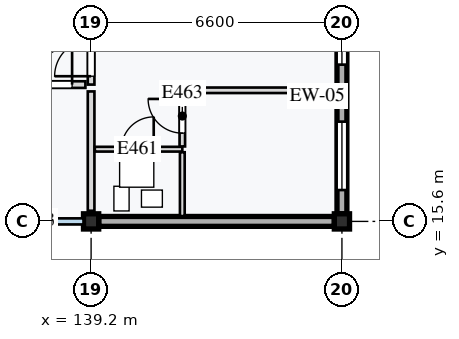
"""IFC4 building model, lengths in metres.
Left out: names, types, materials, properties, quantities, classifications, styles, units other than length and angle.
Written with IfcOpenShell. Run it as: python <this file> out.ifc"""

import sys

from ifc_helpers import new_model, si_unit, direction, frame, frame_2d, origin, origin_2d, place, context, subcontext, project, spatial, rectangle, extrude, element, fill, save


model = new_model("IFC4")
c1 = context("Model", 3, precision=1e-05, world=origin(), true_north=direction((0.0, 1.0)))
c2 = subcontext(c1, "Body", "Model", "MODEL_VIEW")
j1 = project(units=[si_unit("LENGTHUNIT", "METRE"), si_unit("PLANEANGLEUNIT", "RADIAN")], contexts=[c1])
p1 = place(None, origin())
s1 = spatial("IfcSite", under=j1, at=p1, CompositionType="ELEMENT")
p2 = place(p1, origin())
s2 = spatial("IfcBuilding", under=s1, at=p2, CompositionType="ELEMENT")
p3 = place(p2, frame((0.0, 0.0, 40.4)))
s3 = spatial("IfcBuildingStorey", under=s2, at=p3, CompositionType="ELEMENT", Elevation=40.4)
for number, where, z_axis, x_axis in (
    (1, (139.2, 15.6, 0.0), (0.0, 0.0, 1.0), (1.0, 0.0, 0.0)),
    (2, (145.8, 15.6, 0.0), (0.0, 0.0, 1.0), (1.0, 0.0, 0.0)),
):
    element("IfcColumn", number, at=place(p3, frame(where, z_axis=z_axis, x_axis=x_axis)), inside=s3, PredefinedType="COLUMN", context=c2, shape_type="SweptSolid", body=[
        extrude(rectangle(XDim=0.4, YDim=0.4, at=origin_2d()), origin(), (0.0, 0.0, 1.0), 3.2),
    ])
p4 = place(p3, frame((145.8, 15.8, 0.0), z_axis=(0.0, 0.0, 1.0), x_axis=(0.0, 1.0, 0.0)))
e3 = element("IfcWall", 3, at=p4, inside=s3, PredefinedType="STANDARD", context=c2, shape_type="SweptSolid", body=[
    extrude(rectangle(XDim=6.2, YDim=0.26, at=frame_2d((3.1, 0.0))), origin(), (0.0, 0.0, 1.0), 2.6),
])
p5 = place(p4, frame((0.625, 0.0, 0.85)))
e4 = element("IfcOpeningElement", 4, at=p5, cuts=e3, PredefinedType="OPENING", context=c2, shape_type="SweptSolid", body=[
    extrude(rectangle(XDim=1.8, YDim=1.35, at=frame_2d((0.9, 0.675))), frame((0.0, 0.14, 0.0), z_axis=(0.0, -1.0, 0.0), x_axis=(1.0, 0.0, 0.0)), (0.0, 0.0, 1.0), 0.28),
])
p6 = place(p4, frame((3.925, 0.0, 0.85)))
e5 = element("IfcOpeningElement", 5, at=p6, cuts=e3, PredefinedType="OPENING", context=c2, shape_type="SweptSolid", body=[
    extrude(rectangle(XDim=1.8, YDim=1.55, at=frame_2d((0.9, 0.775))), frame((0.0, 0.14, 0.0), z_axis=(0.0, -1.0, 0.0), x_axis=(1.0, 0.0, 0.0)), (0.0, 0.0, 1.0), 0.28),
])
p7 = place(p3, frame((139.4, 15.6, 0.0), z_axis=(0.0, 0.0, 1.0), x_axis=(1.0, 0.0, 0.0)))
e6 = element("IfcWall", 6, at=p7, inside=s3, PredefinedType="STANDARD", context=c2, shape_type="SweptSolid", body=[
    extrude(rectangle(XDim=6.2, YDim=0.26, at=frame_2d((3.1, 0.0))), origin(), (0.0, 0.0, 1.0), 2.65),
])
p8 = place(p3, frame((136.05, 19.2, 0.0), z_axis=(0.0, 0.0, 1.0), x_axis=(1.0, 0.0, 0.0)))
e7 = element("IfcWall", 7, at=p8, inside=s3, PredefinedType="PARTITIONING", context=c2, shape_type="SweptSolid", body=[
    extrude(rectangle(XDim=3.0, YDim=0.175, at=frame_2d((1.5, 0.0))), origin(), (0.0, 0.0, 1.0), 2.94),
])
p9 = place(p8, frame((1.65, 0.0, 0.0)))
e8 = element("IfcOpeningElement", 8, at=p9, cuts=e7, PredefinedType="OPENING", context=c2, shape_type="SweptSolid", body=[
    extrude(rectangle(XDim=1.0, YDim=2.1, at=frame_2d((0.5, 1.05))), frame((0.0, 0.097, 0.0), z_axis=(0.0, -1.0, 0.0), x_axis=(1.0, 0.0, 0.0)), (0.0, 0.0, 1.0), 0.195),
])
p10 = place(p3, frame((139.2, 15.88, 0.0), z_axis=(0.0, 0.0, 1.0), x_axis=(0.0, 1.0, 0.0)))
e9 = element("IfcWall", 9, at=p10, inside=s3, PredefinedType="PARTITIONING", context=c2, shape_type="SweptSolid", body=[
    extrude(rectangle(XDim=3.14, YDim=0.175, at=frame_2d((1.57, 0.0))), origin(), (0.0, 0.0, 1.0), 2.55),
])
p11 = place(p3, frame((139.2, 19.2, 0.0), z_axis=(0.0, 0.0, 1.0), x_axis=(0.0, 1.0, 0.0)))
e10 = element("IfcWall", 10, at=p11, inside=s3, PredefinedType="PARTITIONING", context=c2, shape_type="SweptSolid", body=[
    extrude(rectangle(XDim=3.0, YDim=0.175, at=frame_2d((1.5, 0.0))), origin(), (0.0, 0.0, 1.0), 2.55),
])
p12 = place(p11, frame((0.22, 0.0, 0.0)))
e11 = element("IfcOpeningElement", 11, at=p12, cuts=e10, PredefinedType="OPENING", context=c2, shape_type="SweptSolid", body=[
    extrude(rectangle(XDim=0.96, YDim=2.18, at=frame_2d((0.48, 1.09))), frame((0.0, 0.097, 0.0), z_axis=(0.0, -1.0, 0.0), x_axis=(1.0, 0.0, 0.0)), (0.0, 0.0, 1.0), 0.195),
])
p13 = place(p3, frame((139.298, 17.5, 0.0), z_axis=(0.0, 0.0, 1.0), x_axis=(1.0, 0.0, 0.0)))
e12 = element("IfcWall", 12, at=p13, inside=s3, PredefinedType="PARTITIONING", context=c2, shape_type="SweptSolid", body=[
    extrude(rectangle(XDim=2.302, YDim=0.125, at=frame_2d((1.151, 0.0))), origin(), (0.0, 0.0, 1.0), 2.94),
])
p14 = place(p13, frame((0.7, 0.0, 0.0)))
e13 = element("IfcOpeningElement", 13, at=p14, cuts=e12, PredefinedType="OPENING", context=c2, shape_type="SweptSolid", body=[
    extrude(rectangle(XDim=0.85, YDim=2.04, at=frame_2d((0.425, 1.02))), frame((0.0, 0.073, 0.0), z_axis=(0.0, -1.0, 0.0), x_axis=(1.0, 0.0, 0.0)), (0.0, 0.0, 1.0), 0.145),
])
p15 = place(p3, frame((141.6, 15.74, 0.0), z_axis=(0.0, 0.0, 1.0), x_axis=(0.0, 1.0, 0.0)))
e14 = element("IfcWall", 14, at=p15, inside=s3, PredefinedType="PARTITIONING", context=c2, shape_type="SweptSolid", body=[
    extrude(rectangle(XDim=1.68, YDim=0.125, at=frame_2d((0.84, 0.0))), origin(), (0.0, 0.0, 1.0), 2.94),
])
p16 = place(p3, frame((141.6, 17.573, 0.0), z_axis=(0.0, 0.0, 1.0), x_axis=(0.0, 1.0, 0.0)))
e15 = element("IfcWall", 15, at=p16, inside=s3, PredefinedType="PARTITIONING", context=c2, shape_type="SweptSolid", body=[
    extrude(rectangle(XDim=1.478, YDim=0.145, at=frame_2d((0.739, 0.0))), origin(), (0.0, 0.0, 1.0), 2.94),
])
p17 = place(p16, frame((0.35, 0.0, 0.0)))
e16 = element("IfcOpeningElement", 16, at=p17, cuts=e15, PredefinedType="OPENING", context=c2, shape_type="SweptSolid", body=[
    extrude(rectangle(XDim=0.9, YDim=2.1, at=frame_2d((0.45, 1.05))), frame((0.0, 0.083, 0.0), z_axis=(0.0, -1.0, 0.0), x_axis=(1.0, 0.0, 0.0)), (0.0, 0.0, 1.0), 0.165),
])
p18 = place(p3, frame((141.683, 19.05, 0.0), z_axis=(0.0, 0.0, 1.0), x_axis=(1.0, 0.0, 0.0)))
e17 = element("IfcWall", 17, at=p18, inside=s3, PredefinedType="PARTITIONING", context=c2, shape_type="SweptSolid", body=[
    extrude(rectangle(XDim=3.977, YDim=0.145, at=frame_2d((1.989, 0.0))), origin(), (0.0, 0.0, 1.0), 2.94),
])
p19 = place(p5, origin())
e18 = element("IfcWindow", 18, at=p19, inside=s3, PartitioningType="SINGLE_PANEL", PredefinedType="WINDOW", context=c2, shape_type="SweptSolid", body=[
    extrude(rectangle(XDim=1.8, YDim=1.35, at=frame_2d((0.9, 0.675))), frame((0.0, 0.03, 0.0), z_axis=(0.0, -1.0, 0.0), x_axis=(1.0, 0.0, 0.0)), (0.0, 0.0, 1.0), 0.06),
])
fill(e4, e18)
p20 = place(p6, origin())
e19 = element("IfcWindow", 19, at=p20, inside=s3, PartitioningType="SINGLE_PANEL", PredefinedType="WINDOW", context=c2, shape_type="SweptSolid", body=[
    extrude(rectangle(XDim=1.8, YDim=1.55, at=frame_2d((0.9, 0.775))), frame((0.0, 0.03, 0.0), z_axis=(0.0, -1.0, 0.0), x_axis=(1.0, 0.0, 0.0)), (0.0, 0.0, 1.0), 0.06),
])
fill(e5, e19)
p21 = place(p9, origin())
e20 = element("IfcDoor", 20, at=p21, inside=s3, OperationType="SINGLE_SWING_RIGHT", PredefinedType="DOOR", context=c2, shape_type="SweptSolid", body=[
    extrude(rectangle(XDim=1.0, YDim=2.1, at=frame_2d((0.5, 1.05))), frame((0.0, 0.025, 0.0), z_axis=(0.0, -1.0, 0.0), x_axis=(1.0, 0.0, 0.0)), (0.0, 0.0, 1.0), 0.05),
])
fill(e8, e20)
p22 = place(p12, origin())
e21 = element("IfcDoor", 21, at=p22, inside=s3, OperationType="SINGLE_SWING_LEFT", PredefinedType="DOOR", context=c2, shape_type="SweptSolid", body=[
    extrude(rectangle(XDim=0.96, YDim=2.18, at=frame_2d((0.48, 1.09))), frame((0.0, 0.025, 0.0), z_axis=(0.0, -1.0, 0.0), x_axis=(1.0, 0.0, 0.0)), (0.0, 0.0, 1.0), 0.05),
])
fill(e11, e21)
p23 = place(p14, origin())
e22 = element("IfcDoor", 22, at=p23, inside=s3, OperationType="SINGLE_SWING_RIGHT", PredefinedType="DOOR", context=c2, shape_type="SweptSolid", body=[
    extrude(rectangle(XDim=0.85, YDim=2.04, at=frame_2d((0.425, 1.02))), frame((0.0, 0.025, 0.0), z_axis=(0.0, -1.0, 0.0), x_axis=(1.0, 0.0, 0.0)), (0.0, 0.0, 1.0), 0.05),
])
fill(e13, e22)
p24 = place(p17, origin())
e23 = element("IfcDoor", 23, at=p24, inside=s3, OperationType="SINGLE_SWING_RIGHT", PredefinedType="DOOR", context=c2, shape_type="SweptSolid", body=[
    extrude(rectangle(XDim=0.9, YDim=2.1, at=frame_2d((0.45, 1.05))), frame((0.0, 0.025, 0.0), z_axis=(0.0, -1.0, 0.0), x_axis=(1.0, 0.0, 0.0)), (0.0, 0.0, 1.0), 0.05),
])
fill(e16, e23)
save(model, sys.argv[1])
